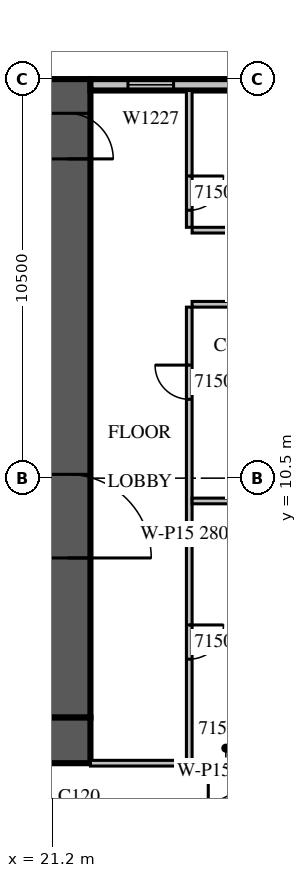
"""IFC4 building model, lengths in metres.
Left out: names, types, materials, properties, quantities, classifications, styles, units other than length and angle.
Written with IfcOpenShell. Run it as: python <this file> out.ifc"""

import sys

from ifc_helpers import new_model, si_unit, direction, frame, frame_2d, origin, place, context, subcontext, project, spatial, rectangle, extrude, source, transform, mapped, element, fill, save


model = new_model("IFC4")
c1 = context("Model", 3, precision=1e-05, world=origin(), true_north=direction((0.0, 1.0)))
c2 = subcontext(c1, "Body", "Model", "MODEL_VIEW")
j1 = project(units=[si_unit("LENGTHUNIT", "METRE"), si_unit("PLANEANGLEUNIT", "RADIAN")], contexts=[c1])
p1 = place(None, origin())
s1 = spatial("IfcSite", under=j1, at=p1, CompositionType="ELEMENT")
p2 = place(p1, origin())
s2 = spatial("IfcBuilding", under=s1, at=p2, CompositionType="ELEMENT")
p3 = place(p2, frame((0.0, 0.0, 74.1)))
s3 = spatial("IfcBuildingStorey", under=s2, at=p3, CompositionType="ELEMENT", Elevation=74.1)
m1 = source(origin(), c2, "Body", "SweptSolid", [
    extrude(rectangle(XDim=16.8, YDim=1.2, at=frame_2d((8.4, 0.0))), origin(), (0.0, 0.0, 1.0), 4.2),
])
p4 = place(p3, frame((21.6, 4.2, 0.0), z_axis=(0.0, 0.0, 1.0), x_axis=(0.0, 1.0, 0.0)))
e1 = element("IfcWall", 1, at=p4, inside=s3, PredefinedType="SHEAR", context=c2, shape_type="MappedRepresentation", body=[
    mapped(m1, transform((0.0, 0.0, 0.0), scale=1.0)),
])
m2 = source(origin(), c2, "Body", "SweptSolid", [
    extrude(rectangle(XDim=2.2, YDim=2.1, at=frame_2d((1.1, 1.05))), frame((0.0, 0.61, 0.0), z_axis=(0.0, -1.0, 0.0), x_axis=(1.0, 0.0, 0.0)), (0.0, 0.0, 1.0), 1.22),
])
p5 = place(p4, frame((4.2, 0.0, 0.0)))
e2 = element("IfcOpeningElement", 2, at=p5, cuts=e1, PredefinedType="OPENING", context=c2, shape_type="MappedRepresentation", body=[
    mapped(m2, transform((0.0, 0.0, 0.0), scale=1.0)),
])
m3 = source(origin(), c2, "Body", "SweptSolid", [
    extrude(rectangle(XDim=1.2, YDim=2.1, at=frame_2d((0.6, 1.05))), frame((0.0, 0.61, 0.0), z_axis=(0.0, -1.0, 0.0), x_axis=(1.0, 0.0, 0.0)), (0.0, 0.0, 1.0), 1.22),
])
p6 = place(p4, frame((14.7, 0.0, 0.0)))
e3 = element("IfcOpeningElement", 3, at=p6, cuts=e1, PredefinedType="OPENING", context=c2, shape_type="MappedRepresentation", body=[
    mapped(m3, transform((0.0, 0.0, 0.0), scale=1.0)),
])
m4 = source(origin(), c2, "Body", "SweptSolid", [
    extrude(rectangle(XDim=18.0, YDim=1.2, at=frame_2d((9.0, 0.0))), origin(), (0.0, 0.0, 1.0), 4.2),
])
p7 = place(p3, frame((4.2, 3.6, 0.0), z_axis=(0.0, 0.0, 1.0), x_axis=(1.0, 0.0, 0.0)))
e4 = element("IfcWall", 4, at=p7, inside=s3, PredefinedType="SHEAR", context=c2, shape_type="MappedRepresentation", body=[
    mapped(m4, transform((0.0, 0.0, 0.0), scale=1.0)),
])
m5 = source(origin(), c2, "Body", "SweptSolid", [
    extrude(rectangle(XDim=6.6, YDim=0.3, at=frame_2d((3.3, 0.0))), origin(), (0.0, 0.0, 1.0), 3.8),
])
p8 = place(p3, frame((28.8, 20.85, 0.0), z_axis=(0.0, 0.0, 1.0), x_axis=(-1.0, 0.0, 0.0)))
e5 = element("IfcWall", 5, at=p8, inside=s3, PredefinedType="STANDARD", context=c2, shape_type="MappedRepresentation", body=[
    mapped(m5, transform((0.0, 0.0, 0.0), scale=1.0)),
])
m6 = source(origin(), c2, "Body", "SweptSolid", [
    extrude(rectangle(XDim=2.4, YDim=2.7, at=frame_2d((1.2, 1.35))), frame((0.0, 0.16, 0.0), z_axis=(0.0, -1.0, 0.0), x_axis=(1.0, 0.0, 0.0)), (0.0, 0.0, 1.0), 0.32),
])
p9 = place(p8, frame((0.3, 0.0, 0.6)))
e6 = element("IfcOpeningElement", 6, at=p9, cuts=e5, PredefinedType="OPENING", context=c2, shape_type="MappedRepresentation", body=[
    mapped(m6, transform((0.0, 0.0, 0.0), scale=1.0)),
])
m7 = source(origin(), c2, "Body", "SweptSolid", [
    extrude(rectangle(XDim=1.2, YDim=2.7, at=frame_2d((0.6, 1.35))), frame((0.0, 0.16, 0.0), z_axis=(0.0, -1.0, 0.0), x_axis=(1.0, 0.0, 0.0)), (0.0, 0.0, 1.0), 0.32),
])
p10 = place(p8, frame((4.412, 0.0, 0.6)))
e7 = element("IfcOpeningElement", 7, at=p10, cuts=e5, PredefinedType="OPENING", context=c2, shape_type="MappedRepresentation", body=[
    mapped(m7, transform((0.0, 0.0, 0.0), scale=1.0)),
])
m8 = source(origin(), c2, "Body", "SweptSolid", [
    extrude(rectangle(XDim=11.925, YDim=0.15, at=frame_2d((5.963, 0.0))), origin(), (0.0, 0.0, 1.0), 2.8),
])
p11 = place(p3, frame((24.8, 15.0, 0.0), z_axis=(0.0, 0.0, 1.0), x_axis=(0.0, -1.0, 0.0)))
e8 = element("IfcWall", 8, at=p11, inside=s3, PredefinedType="PARTITIONING", context=c2, shape_type="MappedRepresentation", body=[
    mapped(m8, transform((0.0, 0.0, 0.0), scale=1.0)),
])
m9 = source(origin(), c2, "Body", "SweptSolid", [
    extrude(rectangle(XDim=0.9, YDim=2.1, at=frame_2d((0.45, 1.05))), frame((0.0, 0.085, 0.0), z_axis=(0.0, -1.0, 0.0), x_axis=(1.0, 0.0, 0.0)), (0.0, 0.0, 1.0), 0.17),
])
p12 = place(p11, frame((8.363, 0.0, 0.0)))
e9 = element("IfcOpeningElement", 9, at=p12, cuts=e8, PredefinedType="OPENING", context=c2, shape_type="MappedRepresentation", body=[
    mapped(m9, transform((0.0, 0.0, 0.0), scale=1.0)),
])
p13 = place(p11, frame((1.525, 0.0, 0.0)))
e10 = element("IfcOpeningElement", 10, at=p13, cuts=e8, PredefinedType="OPENING", context=c2, shape_type="MappedRepresentation", body=[
    mapped(m9, transform((0.0, 0.0, 0.0), scale=1.0)),
])
m10 = source(origin(), c2, "Body", "SweptSolid", [
    extrude(rectangle(XDim=3.6, YDim=0.15, at=frame_2d((1.8, 0.0))), origin(), (0.0, 0.0, 1.0), 3.8),
])
p14 = place(p3, frame((24.8, 20.7, 0.0), z_axis=(0.0, 0.0, 1.0), x_axis=(0.0, -1.0, 0.0)))
e11 = element("IfcWall", 11, at=p14, inside=s3, PredefinedType="PARTITIONING", context=c2, shape_type="MappedRepresentation", body=[
    mapped(m10, transform((0.0, 0.0, 0.0), scale=1.0)),
])
p15 = place(p14, frame((2.25, 0.0, 0.0)))
e12 = element("IfcOpeningElement", 12, at=p15, cuts=e11, PredefinedType="OPENING", context=c2, shape_type="MappedRepresentation", body=[
    mapped(m9, transform((0.0, 0.0, 0.0), scale=1.0)),
])
p16 = place(p3, frame((29.325, 9.9, 0.0), z_axis=(0.0, 0.0, 1.0), x_axis=(-1.0, 0.0, 0.0)))
e13 = element("IfcWall", 13, at=p16, inside=s3, PredefinedType="PARTITIONING", context=c2, shape_type="SweptSolid", body=[
    extrude(rectangle(XDim=4.45, YDim=0.15, at=frame_2d((2.225, 0.0))), origin(), (0.0, 0.0, 1.0), 3.3),
])
m11 = source(origin(), c2, "Body", "SweptSolid", [
    extrude(rectangle(XDim=4.45, YDim=0.15, at=frame_2d((2.225, 0.0))), origin(), (0.0, 0.0, 1.0), 3.8),
])
for number, where, z_axis, x_axis in (
    (14, (29.325, 15.075, 0.0), (0.0, 0.0, 1.0), (-1.0, 0.0, 0.0)),
    (15, (24.875, 17.025, 0.0), (0.0, 0.0, 1.0), (1.0, 0.0, 0.0)),
):
    element("IfcWall", number, at=place(p3, frame(where, z_axis=z_axis, x_axis=x_axis)), inside=s3, PredefinedType="PARTITIONING", context=c2, shape_type="MappedRepresentation", body=[
        mapped(m11, transform((0.0, 0.0, 0.0), scale=1.0)),
    ])
m12 = source(origin(), c2, "Body", "SweptSolid", [
    extrude(rectangle(XDim=7.125, YDim=0.15, at=frame_2d((3.562, 0.0))), origin(), (0.0, 0.0, 1.0), 3.3),
])
p17 = place(p3, frame((22.2, 3.0, 0.0), z_axis=(0.0, 0.0, 1.0), x_axis=(1.0, 0.0, 0.0)))
e16 = element("IfcWall", 16, at=p17, inside=s3, PredefinedType="PARTITIONING", context=c2, shape_type="MappedRepresentation", body=[
    mapped(m12, transform((0.0, 0.0, 0.0), scale=1.0)),
])
m13 = source(origin(), c2, "Body", "SweptSolid", [
    extrude(rectangle(XDim=1.0, YDim=2.1, at=frame_2d((0.5, 1.05))), frame((0.0, 0.085, 0.0), z_axis=(0.0, -1.0, 0.0), x_axis=(1.0, 0.0, 0.0)), (0.0, 0.0, 1.0), 0.17),
])
p18 = place(p17, frame((3.1, 0.0, 0.0)))
e17 = element("IfcOpeningElement", 17, at=p18, cuts=e16, PredefinedType="OPENING", context=c2, shape_type="MappedRepresentation", body=[
    mapped(m13, transform((0.0, 0.0, 0.0), scale=1.0)),
])
p19 = place(p17, frame((4.162, 0.0, 0.0)))
e18 = element("IfcOpeningElement", 18, at=p19, cuts=e16, PredefinedType="OPENING", context=c2, shape_type="MappedRepresentation", body=[
    mapped(m9, transform((0.0, 0.0, 0.0), scale=1.0)),
])
m14 = source(origin(), c2, "Body", "SweptSolid", [
    extrude(rectangle(XDim=1.2, YDim=2.7, at=frame_2d((0.6, 1.35))), frame((0.0, 0.03, 0.0), z_axis=(0.0, -1.0, 0.0), x_axis=(1.0, 0.0, 0.0)), (0.0, 0.0, 1.0), 0.06),
])
p20 = place(p10, origin())
e19 = element("IfcWindow", 19, at=p20, inside=s3, PartitioningType="SINGLE_PANEL", PredefinedType="WINDOW", context=c2, shape_type="MappedRepresentation", body=[
    mapped(m14, transform((0.0, 0.0, 0.0), scale=1.0)),
])
fill(e7, e19)
m15 = source(origin(), c2, "Body", "SweptSolid", [
    extrude(rectangle(XDim=2.2, YDim=2.1, at=frame_2d((1.1, 1.05))), frame((0.0, 0.025, 0.0), z_axis=(0.0, -1.0, 0.0), x_axis=(1.0, 0.0, 0.0)), (0.0, 0.0, 1.0), 0.05),
])
p21 = place(p5, origin())
e20 = element("IfcDoor", 20, at=p21, inside=s3, OperationType="DOUBLE_DOOR_SINGLE_SWING", PredefinedType="DOOR", context=c2, shape_type="MappedRepresentation", body=[
    mapped(m15, transform((0.0, 0.0, 0.0), scale=1.0)),
])
fill(e2, e20)
m16 = source(origin(), c2, "Body", "SweptSolid", [
    extrude(rectangle(XDim=1.2, YDim=2.1, at=frame_2d((0.6, 1.05))), frame((0.0, 0.025, 0.0), z_axis=(0.0, -1.0, 0.0), x_axis=(1.0, 0.0, 0.0)), (0.0, 0.0, 1.0), 0.05),
])
p22 = place(p6, origin())
e21 = element("IfcDoor", 21, at=p22, inside=s3, OperationType="SINGLE_SWING_RIGHT", PredefinedType="DOOR", context=c2, shape_type="MappedRepresentation", body=[
    mapped(m16, transform((0.0, 0.0, 0.0), scale=1.0)),
])
fill(e3, e21)
m17 = source(origin(), c2, "Body", "SweptSolid", [
    extrude(rectangle(XDim=0.9, YDim=2.1, at=frame_2d((0.45, 1.05))), frame((0.0, 0.025, 0.0), z_axis=(0.0, -1.0, 0.0), x_axis=(1.0, 0.0, 0.0)), (0.0, 0.0, 1.0), 0.05),
])
p23 = place(p12, origin())
e22 = element("IfcDoor", 22, at=p23, inside=s3, OperationType="SINGLE_SWING_LEFT", PredefinedType="DOOR", context=c2, shape_type="MappedRepresentation", body=[
    mapped(m17, transform((0.0, 0.0, 0.0), scale=1.0)),
])
fill(e9, e22)
p24 = place(p13, origin())
e23 = element("IfcDoor", 23, at=p24, inside=s3, OperationType="SINGLE_SWING_RIGHT", PredefinedType="DOOR", context=c2, shape_type="MappedRepresentation", body=[
    mapped(m17, transform((0.0, 0.0, 0.0), scale=1.0)),
])
fill(e10, e23)
p25 = place(p15, origin())
e24 = element("IfcDoor", 24, at=p25, inside=s3, OperationType="SINGLE_SWING_LEFT", PredefinedType="DOOR", context=c2, shape_type="MappedRepresentation", body=[
    mapped(m17, transform((0.0, 0.0, 0.0), scale=1.0)),
])
fill(e12, e24)
m18 = source(origin(), c2, "Body", "SweptSolid", [
    extrude(rectangle(XDim=1.0, YDim=2.1, at=frame_2d((0.5, 1.05))), frame((0.0, 0.025, 0.0), z_axis=(0.0, -1.0, 0.0), x_axis=(1.0, 0.0, 0.0)), (0.0, 0.0, 1.0), 0.05),
])
p26 = place(p18, origin())
e25 = element("IfcDoor", 25, at=p26, inside=s3, OperationType="SINGLE_SWING_RIGHT", PredefinedType="DOOR", context=c2, shape_type="MappedRepresentation", body=[
    mapped(m18, transform((0.0, 0.0, 0.0), scale=1.0)),
])
fill(e17, e25)
save(model, sys.argv[1])
